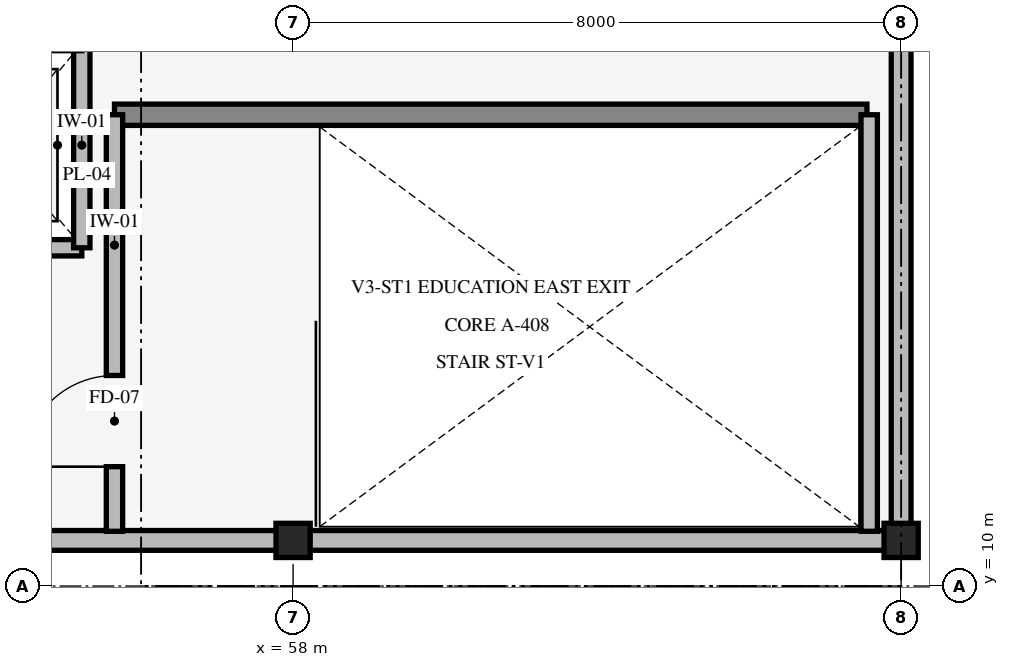
"""IFC4 building model, lengths in metres.
Left out: names, types, materials, properties, quantities, classifications, styles, units other than length and angle.
Written with IfcOpenShell. Run it as: python <this file> out.ifc"""

import sys

from ifc_helpers import new_model, si_unit, direction, frame, frame_2d, origin, origin_2d, place, context, subcontext, project, spatial, rectangle, extrude, element, fill, save


model = new_model("IFC4")
c1 = context("Model", 3, precision=1e-05, world=origin(), true_north=direction((0.0, 1.0)))
c2 = subcontext(c1, "Body", "Model", "MODEL_VIEW")
j1 = project(units=[si_unit("LENGTHUNIT", "METRE"), si_unit("PLANEANGLEUNIT", "RADIAN")], contexts=[c1])
p1 = place(None, origin())
s1 = spatial("IfcSite", under=j1, at=p1, CompositionType="ELEMENT")
p2 = place(p1, origin())
s2 = spatial("IfcBuilding", under=s1, at=p2, CompositionType="ELEMENT")
p3 = place(p2, frame((0.0, 0.0, 10.2)))
s3 = spatial("IfcBuildingStorey", under=s2, at=p3, CompositionType="ELEMENT", Elevation=10.2)
for number, where, z_axis, x_axis in (
    (1, (58.0, 10.6, 0.0), (0.0, 0.0, 1.0), (1.0, 0.0, 0.0)),
    (2, (66.0, 10.6, 0.0), (0.0, 0.0, 1.0), (1.0, 0.0, 0.0)),
):
    element("IfcColumn", number, at=place(p3, frame(where, z_axis=z_axis, x_axis=x_axis)), inside=s3, PredefinedType="COLUMN", context=c2, shape_type="SweptSolid", body=[
        extrude(rectangle(XDim=0.45, YDim=0.45, at=origin_2d()), origin(), (0.0, 0.0, 1.0), 4.8),
    ])
p4 = place(p3, frame((66.0, 10.6, 0.0), z_axis=(0.0, 0.0, 1.0), x_axis=(-1.0, 0.0, 0.0)))
e3 = element("IfcWall", 3, at=p4, inside=s3, PredefinedType="STANDARD", context=c2, shape_type="SweptSolid", body=[
    extrude(rectangle(XDim=8.0, YDim=0.26, at=frame_2d((4.0, 0.0))), origin(), (0.0, 0.0, 1.0), 4.01),
])
p5 = place(p3, frame((58.0, 10.6, 0.0), z_axis=(0.0, 0.0, 1.0), x_axis=(-1.0, 0.0, 0.0)))
e4 = element("IfcWall", 4, at=p5, inside=s3, PredefinedType="STANDARD", context=c2, shape_type="SweptSolid", body=[
    extrude(rectangle(XDim=8.0, YDim=0.26, at=frame_2d((4.0, 0.0))), origin(), (0.0, 0.0, 1.0), 4.01),
])
p6 = place(p5, frame((5.692, 0.0, 0.85)))
e5 = element("IfcOpeningElement", 5, at=p6, cuts=e4, PredefinedType="OPENING", context=c2, shape_type="SweptSolid", body=[
    extrude(rectangle(XDim=1.2, YDim=1.2, at=frame_2d((0.6, 0.6))), frame((0.0, 0.14, 0.0), z_axis=(0.0, -1.0, 0.0), x_axis=(1.0, 0.0, 0.0)), (0.0, 0.0, 1.0), 0.28),
])
p7 = place(p3, frame((66.0, 18.0, 0.0), z_axis=(0.0, 0.0, 1.0), x_axis=(0.0, -1.0, 0.0)))
e6 = element("IfcWall", 6, at=p7, inside=s3, PredefinedType="STANDARD", context=c2, shape_type="SweptSolid", body=[
    extrude(rectangle(XDim=7.4, YDim=0.26, at=frame_2d((3.7, 0.0))), origin(), (0.0, 0.0, 1.0), 4.01),
])
p8 = place(p3, frame((55.65, 16.2, 0.0), z_axis=(0.0, 0.0, 1.0), x_axis=(1.0, 0.0, 0.0)))
e7 = element("IfcWall", 7, at=p8, inside=s3, PredefinedType="SHEAR", context=c2, shape_type="SweptSolid", body=[
    extrude(rectangle(XDim=9.9, YDim=0.28, at=frame_2d((4.95, 0.0))), origin(), (0.0, 0.0, 1.0), 4.4),
])
p9 = place(p3, frame((55.65, 10.72, 0.0), z_axis=(0.0, 0.0, 1.0), x_axis=(0.0, 1.0, 0.0)))
e8 = element("IfcWall", 8, at=p9, inside=s3, PredefinedType="STANDARD", context=c2, shape_type="SweptSolid", body=[
    extrude(rectangle(XDim=5.48, YDim=0.215, at=frame_2d((2.74, 0.0))), origin(), (0.0, 0.0, 1.0), 4.5),
])
p10 = place(p9, frame((0.85, 0.0, 0.0)))
e9 = element("IfcOpeningElement", 9, at=p10, cuts=e8, PredefinedType="OPENING", context=c2, shape_type="SweptSolid", body=[
    extrude(rectangle(XDim=1.2, YDim=2.1, at=frame_2d((0.6, 1.05))), frame((0.0, 0.118, 0.0), z_axis=(0.0, -1.0, 0.0), x_axis=(1.0, 0.0, 0.0)), (0.0, 0.0, 1.0), 0.235),
])
p11 = place(p3, frame((65.58, 10.72, 0.0), z_axis=(0.0, 0.0, 1.0), x_axis=(0.0, 1.0, 0.0)))
e10 = element("IfcWall", 10, at=p11, inside=s3, PredefinedType="STANDARD", context=c2, shape_type="SweptSolid", body=[
    extrude(rectangle(XDim=5.48, YDim=0.215, at=frame_2d((2.74, 0.0))), origin(), (0.0, 0.0, 1.0), 4.38),
])
p12 = place(p3, frame((52.98, 14.45, 0.0), z_axis=(0.0, 0.0, 1.0), x_axis=(1.0, 0.0, 0.0)))
e11 = element("IfcWall", 11, at=p12, inside=s3, PredefinedType="STANDARD", context=c2, shape_type="SweptSolid", body=[
    extrude(rectangle(XDim=2.24, YDim=0.215, at=frame_2d((1.12, 0.0))), origin(), (0.0, 0.0, 1.0), 4.5),
])
p13 = place(p12, frame((0.595, 0.0, 0.0)))
e12 = element("IfcOpeningElement", 12, at=p13, cuts=e11, PredefinedType="OPENING", context=c2, shape_type="SweptSolid", body=[
    extrude(rectangle(XDim=1.05, YDim=2.2, at=frame_2d((0.525, 1.1))), frame((0.0, 0.118, 0.0), z_axis=(0.0, -1.0, 0.0), x_axis=(1.0, 0.0, 0.0)), (0.0, 0.0, 1.0), 0.235),
])
p14 = place(p3, frame((55.22, 14.45, 0.0), z_axis=(0.0, 0.0, 1.0), x_axis=(0.0, 1.0, 0.0)))
e13 = element("IfcWall", 13, at=p14, inside=s3, PredefinedType="STANDARD", context=c2, shape_type="SweptSolid", body=[
    extrude(rectangle(XDim=2.7, YDim=0.215, at=frame_2d((1.35, 0.0))), origin(), (0.0, 0.0, 1.0), 4.5),
])
p15 = place(p10, origin())
e14 = element("IfcDoor", 14, at=p15, inside=s3, OperationType="SINGLE_SWING_LEFT", PredefinedType="DOOR", context=c2, shape_type="SweptSolid", body=[
    extrude(rectangle(XDim=1.2, YDim=2.1, at=frame_2d((0.6, 1.05))), frame((0.0, 0.025, 0.0), z_axis=(0.0, -1.0, 0.0), x_axis=(1.0, 0.0, 0.0)), (0.0, 0.0, 1.0), 0.05),
])
fill(e9, e14)
save(model, sys.argv[1])
